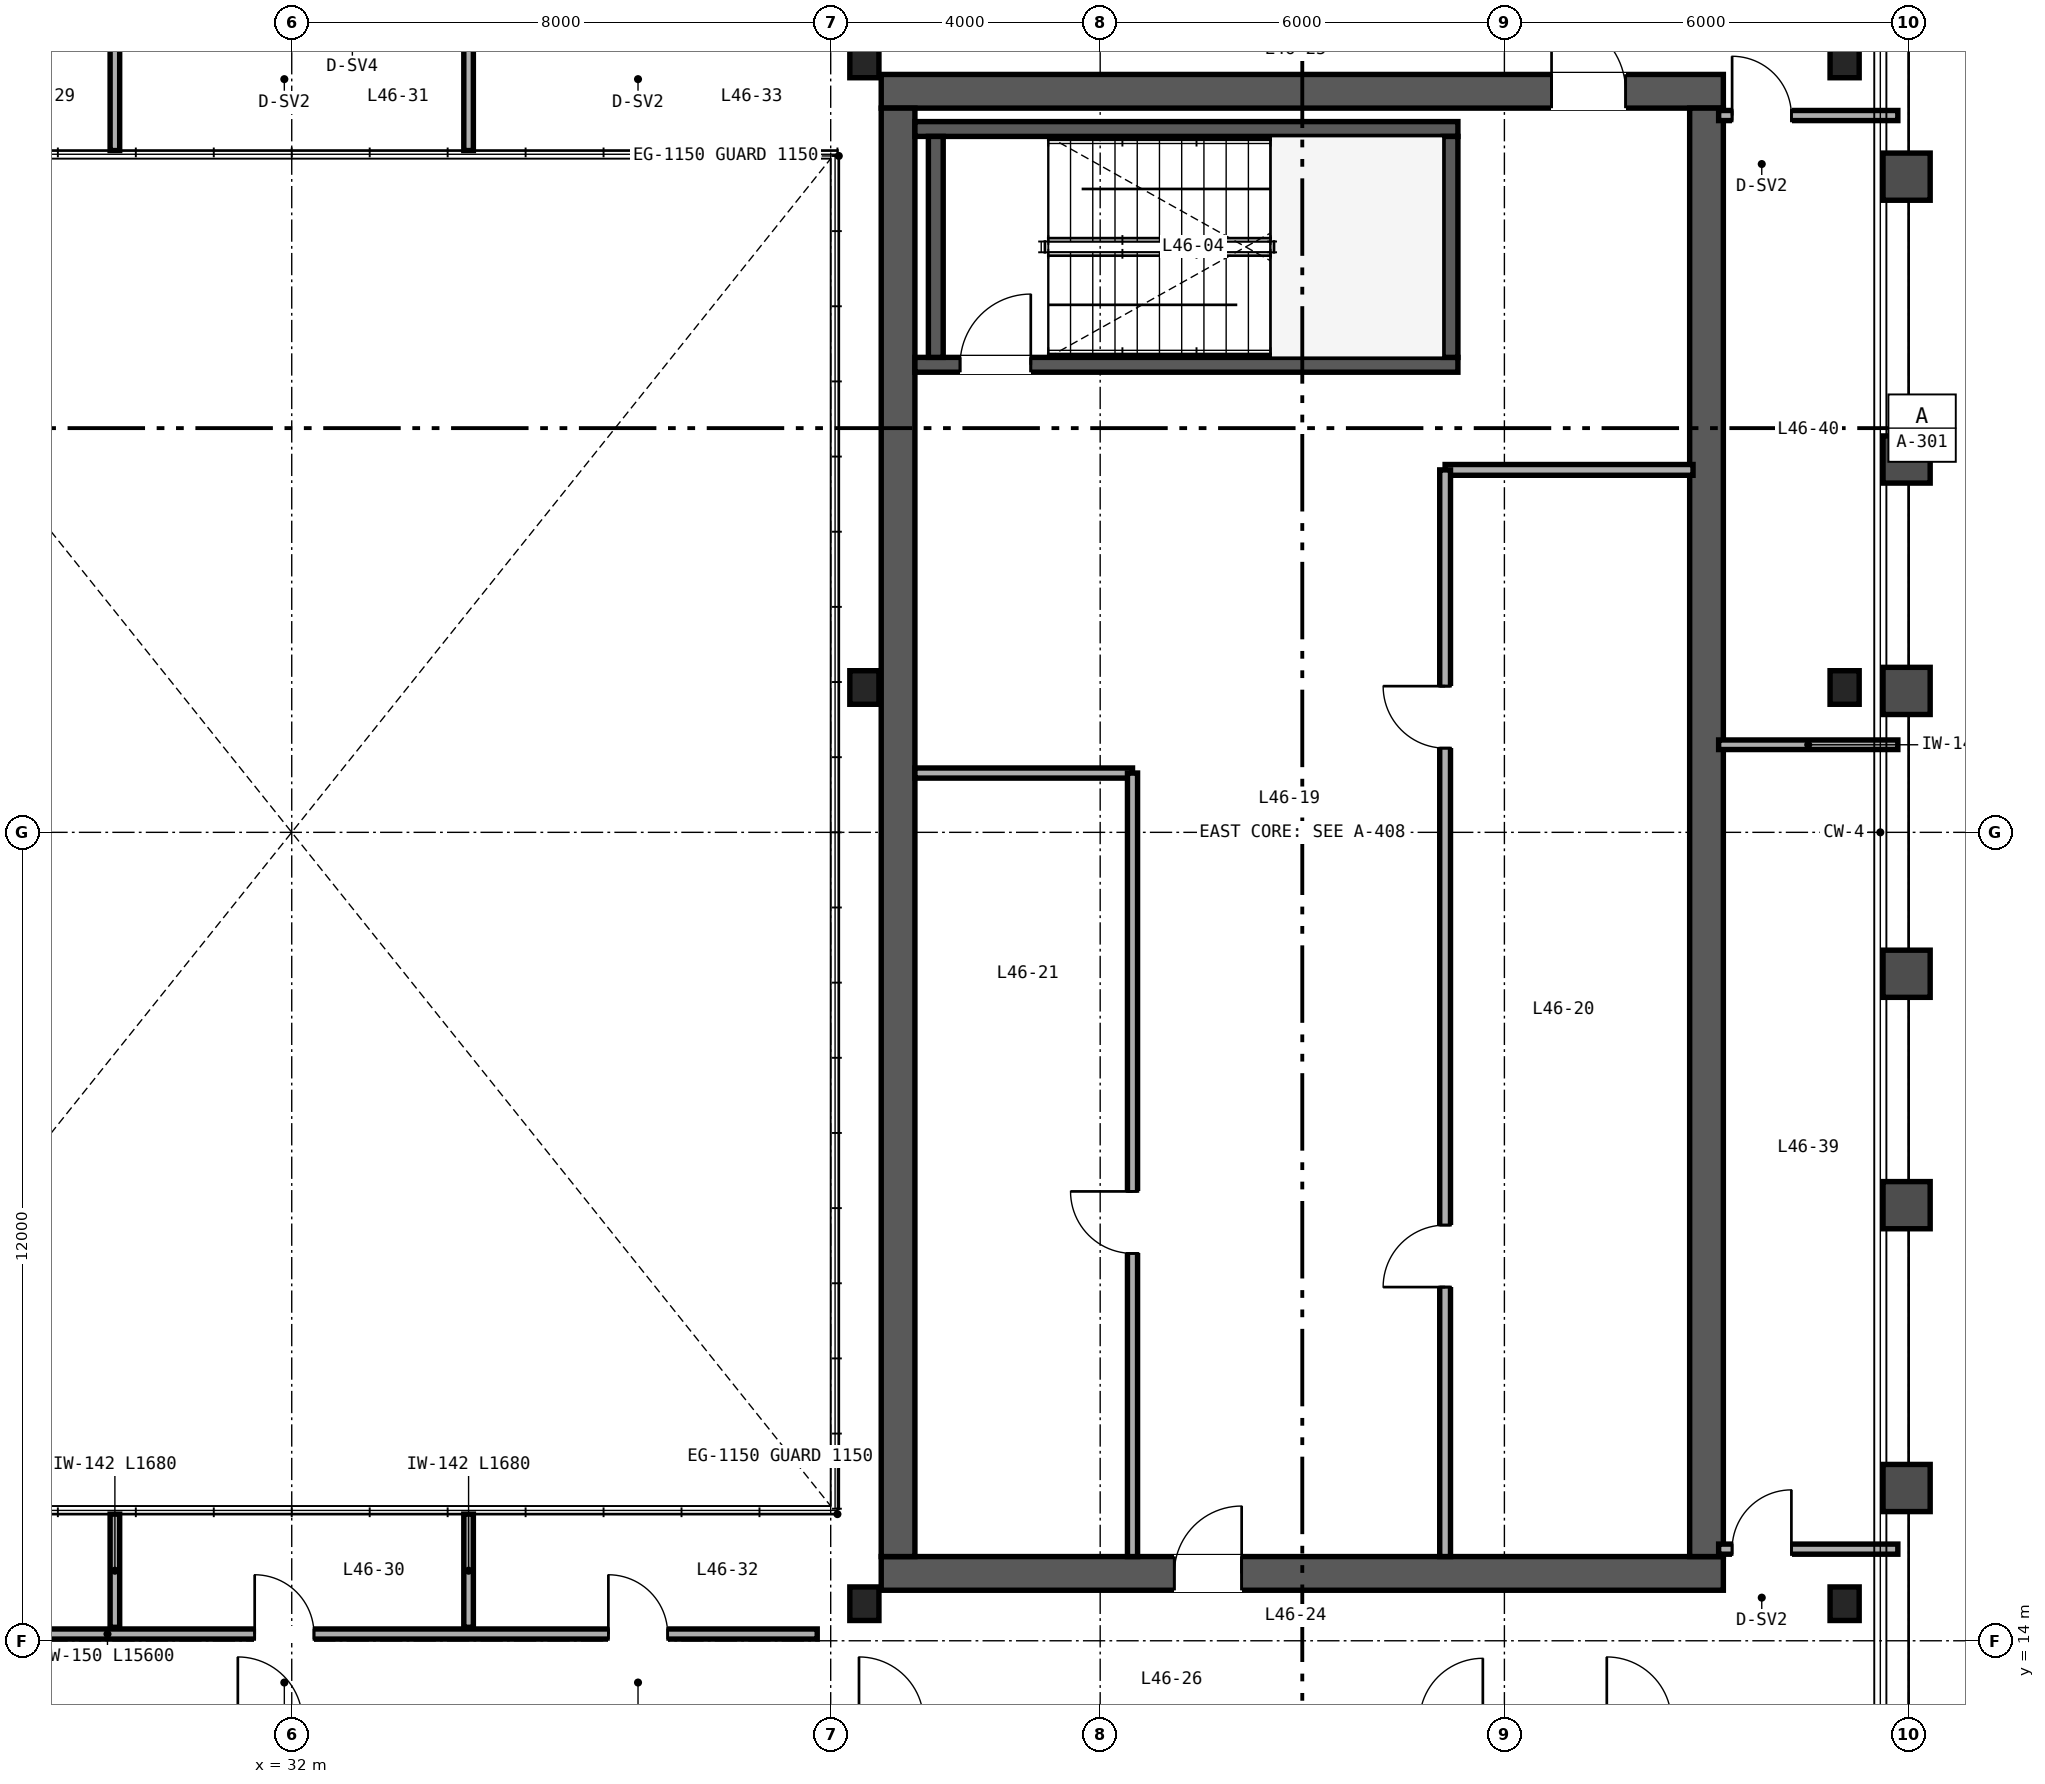
"""IFC4 building model, lengths in metres.
Left out: names, types, materials, properties, quantities, classifications, styles, units other than length and angle.
Written with IfcOpenShell. Run it as: python <this file> out.ifc"""

import sys

from ifc_helpers import new_model, si_unit, direction, frame, frame_2d, origin, origin_2d, place, context, subcontext, project, spatial, rectangle, i_section, extrude, source, transform, mapped, element, fill, save


model = new_model("IFC4")
c1 = context("Model", 3, precision=1e-05, world=origin(), true_north=direction((0.0, 1.0)))
c2 = subcontext(c1, "Body", "Model", "MODEL_VIEW")
j1 = project(units=[si_unit("LENGTHUNIT", "METRE"), si_unit("PLANEANGLEUNIT", "RADIAN")], contexts=[c1])
p1 = place(None, origin())
s1 = spatial("IfcSite", under=j1, at=p1, CompositionType="ELEMENT")
p2 = place(p1, origin())
s2 = spatial("IfcBuilding", under=s1, at=p2, CompositionType="ELEMENT")
p3 = place(p2, frame((0.0, 0.0, 184.8)))
s3 = spatial("IfcBuildingStorey", under=s2, at=p3, CompositionType="ELEMENT", Elevation=184.8)
p4 = place(p3, frame((40.75, 15.0, 0.0), z_axis=(0.0, 0.0, 1.0), x_axis=(1.0, 0.0, 0.0)))
e1 = element("IfcWall", 1, at=p4, inside=s3, PredefinedType="SHEAR", context=c2, shape_type="SweptSolid", body=[
    extrude(rectangle(XDim=12.5, YDim=0.5, at=frame_2d((6.25, 0.0))), origin(), (0.0, 0.0, 1.0), 3.37),
])
p5 = place(p4, frame((4.35, 0.0, 0.0)))
e2 = element("IfcOpeningElement", 2, at=p5, cuts=e1, PredefinedType="OPENING", context=c2, shape_type="SweptSolid", body=[
    extrude(rectangle(XDim=1.0, YDim=2.15, at=frame_2d((0.5, 1.075))), frame((0.0, 0.26, 0.0), z_axis=(0.0, -1.0, 0.0), x_axis=(1.0, 0.0, 0.0)), (0.0, 0.0, 1.0), 0.52),
])
p6 = place(p3, frame((40.75, 37.0, 0.0), z_axis=(0.0, 0.0, 1.0), x_axis=(1.0, 0.0, 0.0)))
e3 = element("IfcWall", 3, at=p6, inside=s3, PredefinedType="SHEAR", context=c2, shape_type="SweptSolid", body=[
    extrude(rectangle(XDim=12.5, YDim=0.5, at=frame_2d((6.25, 0.0))), origin(), (0.0, 0.0, 1.0), 3.37),
])
p7 = place(p6, frame((9.95, 0.0, 0.0)))
e4 = element("IfcOpeningElement", 4, at=p7, cuts=e3, PredefinedType="OPENING", context=c2, shape_type="SweptSolid", body=[
    extrude(rectangle(XDim=1.1, YDim=2.15, at=frame_2d((0.55, 1.075))), frame((0.0, 0.26, 0.0), z_axis=(0.0, -1.0, 0.0), x_axis=(1.0, 0.0, 0.0)), (0.0, 0.0, 1.0), 0.52),
])
for number, where, z_axis, x_axis in (
    (5, (41.0, 15.25, 0.0), (0.0, 0.0, 1.0), (0.0, 1.0, 0.0)),
    (6, (53.0, 15.25, 0.0), (0.0, 0.0, 1.0), (0.0, 1.0, 0.0)),
):
    element("IfcWall", number, at=place(p3, frame(where, z_axis=z_axis, x_axis=x_axis)), inside=s3, PredefinedType="SHEAR", context=c2, shape_type="SweptSolid", body=[
        extrude(rectangle(XDim=21.5, YDim=0.5, at=frame_2d((10.75, 0.0))), origin(), (0.0, 0.0, 1.0), 3.37),
    ])
p8 = place(p3, frame((41.25, 32.94, 0.0), z_axis=(0.0, 0.0, 1.0), x_axis=(1.0, 0.0, 0.0)))
e7 = element("IfcWall", 7, at=p8, inside=s3, PredefinedType="SHEAR", context=c2, shape_type="SweptSolid", body=[
    extrude(rectangle(XDim=8.06, YDim=0.22, at=frame_2d((4.03, 0.0))), origin(), (0.0, 0.0, 1.0), 3.4),
])
p9 = place(p8, frame((0.67, 0.0, 0.0)))
e8 = element("IfcOpeningElement", 8, at=p9, cuts=e7, PredefinedType="OPENING", context=c2, shape_type="SweptSolid", body=[
    extrude(rectangle(XDim=1.05, YDim=2.15, at=frame_2d((0.525, 1.075))), frame((0.0, 0.12, 0.0), z_axis=(0.0, -1.0, 0.0), x_axis=(1.0, 0.0, 0.0)), (0.0, 0.0, 1.0), 0.24),
])
p10 = place(p3, frame((41.25, 36.44, 0.0), z_axis=(0.0, 0.0, 1.0), x_axis=(1.0, 0.0, 0.0)))
e9 = element("IfcWall", 9, at=p10, inside=s3, PredefinedType="SHEAR", context=c2, shape_type="SweptSolid", body=[
    extrude(rectangle(XDim=8.06, YDim=0.22, at=frame_2d((4.03, 0.0))), origin(), (0.0, 0.0, 1.0), 3.4),
])
for number, where, z_axis, x_axis in (
    (10, (41.56, 33.05, 0.0), (0.0, 0.0, 1.0), (0.0, 1.0, 0.0)),
    (11, (49.2, 33.05, 0.0), (0.0, 0.0, 1.0), (0.0, 1.0, 0.0)),
):
    element("IfcWall", number, at=place(p3, frame(where, z_axis=z_axis, x_axis=x_axis)), inside=s3, PredefinedType="SHEAR", context=c2, shape_type="SweptSolid", body=[
        extrude(rectangle(XDim=3.28, YDim=0.22, at=frame_2d((1.64, 0.0))), origin(), (0.0, 0.0, 1.0), 3.4),
    ])
m1 = source(origin(), c2, "Body", "SweptSolid", [
    extrude(i_section(OverallWidth=0.432, OverallDepth=0.498, WebThickness=0.056, FlangeThickness=0.089, FilletRadius=0.025, at=origin_2d()), origin(), (0.0, 0.0, 1.0), 3.37),
])
for number, where, z_axis, x_axis in (
    (12, (40.5, 14.55, 0.0), (0.0, 0.0, 1.0), (1.0, 0.0, 0.0)),
    (13, (55.05, 14.55, 0.0), (0.0, 0.0, 1.0), (1.0, 0.0, 0.0)),
    (14, (40.5, 28.15, 0.0), (0.0, 0.0, 1.0), (1.0, 0.0, 0.0)),
    (15, (55.05, 28.15, 0.0), (0.0, 0.0, 1.0), (1.0, 0.0, 0.0)),
    (16, (40.5, 37.45, 0.0), (0.0, 0.0, 1.0), (1.0, 0.0, 0.0)),
    (17, (55.05, 37.45, 0.0), (0.0, 0.0, 1.0), (1.0, 0.0, 0.0)),
):
    element("IfcColumn", number, at=place(p3, frame(where, z_axis=z_axis, x_axis=x_axis)), inside=s3, PredefinedType="COLUMN", context=c2, shape_type="MappedRepresentation", body=[
        mapped(m1, transform((0.0, 0.0, 0.0), scale=1.0)),
    ])
p11 = place(p3, frame((49.12, 31.38, 0.0), z_axis=(0.0, 0.0, 1.0), x_axis=(1.0, 0.0, 0.0)))
e18 = element("IfcWall", 18, at=p11, inside=s3, PredefinedType="PARTITIONING", context=c2, shape_type="SweptSolid", body=[
    extrude(rectangle(XDim=3.68, YDim=0.16, at=frame_2d((1.84, 0.0))), origin(), (0.0, 0.0, 1.0), 2.47),
])
p12 = place(p3, frame((49.12, 15.25, 0.0), z_axis=(0.0, 0.0, 1.0), x_axis=(0.0, 1.0, 0.0)))
e19 = element("IfcWall", 19, at=p12, inside=s3, PredefinedType="PARTITIONING", context=c2, shape_type="SweptSolid", body=[
    extrude(rectangle(XDim=16.13, YDim=0.16, at=frame_2d((8.065, 0.0))), origin(), (0.0, 0.0, 1.0), 2.443),
])
p13 = place(p12, frame((4.0, 0.0, 0.0)))
e20 = element("IfcOpeningElement", 20, at=p13, cuts=e19, PredefinedType="OPENING", context=c2, shape_type="SweptSolid", body=[
    extrude(rectangle(XDim=0.92, YDim=2.15, at=frame_2d((0.46, 1.075))), frame((0.0, 0.09, 0.0), z_axis=(0.0, -1.0, 0.0), x_axis=(1.0, 0.0, 0.0)), (0.0, 0.0, 1.0), 0.18),
])
p14 = place(p12, frame((12.0, 0.0, 0.0)))
e21 = element("IfcOpeningElement", 21, at=p14, cuts=e19, PredefinedType="OPENING", context=c2, shape_type="SweptSolid", body=[
    extrude(rectangle(XDim=0.92, YDim=2.15, at=frame_2d((0.46, 1.075))), frame((0.0, 0.09, 0.0), z_axis=(0.0, -1.0, 0.0), x_axis=(1.0, 0.0, 0.0)), (0.0, 0.0, 1.0), 0.18),
])
p15 = place(p3, frame((41.25, 26.88, 0.0), z_axis=(0.0, 0.0, 1.0), x_axis=(1.0, 0.0, 0.0)))
e22 = element("IfcWall", 22, at=p15, inside=s3, PredefinedType="PARTITIONING", context=c2, shape_type="SweptSolid", body=[
    extrude(rectangle(XDim=3.23, YDim=0.15, at=frame_2d((1.615, 0.0))), origin(), (0.0, 0.0, 1.0), 3.37),
])
p16 = place(p3, frame((44.48, 15.25, 0.0), z_axis=(0.0, 0.0, 1.0), x_axis=(0.0, 1.0, 0.0)))
e23 = element("IfcWall", 23, at=p16, inside=s3, PredefinedType="PARTITIONING", context=c2, shape_type="SweptSolid", body=[
    extrude(rectangle(XDim=11.63, YDim=0.15, at=frame_2d((5.815, 0.0))), origin(), (0.0, 0.0, 1.0), 3.37),
])
p17 = place(p16, frame((4.5, 0.0, 0.0)))
e24 = element("IfcOpeningElement", 24, at=p17, cuts=e23, PredefinedType="OPENING", context=c2, shape_type="SweptSolid", body=[
    extrude(rectangle(XDim=0.92, YDim=2.15, at=frame_2d((0.46, 1.075))), frame((0.0, 0.085, 0.0), z_axis=(0.0, -1.0, 0.0), x_axis=(1.0, 0.0, 0.0)), (0.0, 0.0, 1.0), 0.17),
])
p18 = place(p3, frame((24.2, 14.1, 0.0), z_axis=(0.0, 0.0, 1.0), x_axis=(1.0, 0.0, 0.0)))
e25 = element("IfcWall", 25, at=p18, inside=s3, PredefinedType="PARTITIONING", context=c2, shape_type="SweptSolid", body=[
    extrude(rectangle(XDim=15.6, YDim=0.15, at=frame_2d((7.8, 0.0))), origin(), (0.0, 0.0, 1.0), 3.37),
])
p19 = place(p18, frame((2.0, 0.0, 0.0)))
e26 = element("IfcOpeningElement", 26, at=p19, cuts=e25, PredefinedType="OPENING", context=c2, shape_type="SweptSolid", body=[
    extrude(rectangle(XDim=0.88, YDim=2.15, at=frame_2d((0.44, 1.075))), frame((0.0, 0.085, 0.0), z_axis=(0.0, -1.0, 0.0), x_axis=(1.0, 0.0, 0.0)), (0.0, 0.0, 1.0), 0.17),
])
p20 = place(p18, frame((7.25, 0.0, 0.0)))
e27 = element("IfcOpeningElement", 27, at=p20, cuts=e25, PredefinedType="OPENING", context=c2, shape_type="SweptSolid", body=[
    extrude(rectangle(XDim=0.88, YDim=2.15, at=frame_2d((0.44, 1.075))), frame((0.0, 0.085, 0.0), z_axis=(0.0, -1.0, 0.0), x_axis=(1.0, 0.0, 0.0)), (0.0, 0.0, 1.0), 0.17),
])
p21 = place(p18, frame((12.5, 0.0, 0.0)))
e28 = element("IfcOpeningElement", 28, at=p21, cuts=e25, PredefinedType="OPENING", context=c2, shape_type="SweptSolid", body=[
    extrude(rectangle(XDim=0.88, YDim=2.15, at=frame_2d((0.44, 1.075))), frame((0.0, 0.085, 0.0), z_axis=(0.0, -1.0, 0.0), x_axis=(1.0, 0.0, 0.0)), (0.0, 0.0, 1.0), 0.17),
])
for number, where, z_axis, x_axis in (
    (29, (29.375, 14.2, 0.0), (0.0, 0.0, 1.0), (0.0, 1.0, 0.0)),
    (30, (29.375, 36.12, 0.0), (0.0, 0.0, 1.0), (0.0, 1.0, 0.0)),
    (31, (34.625, 14.2, 0.0), (0.0, 0.0, 1.0), (0.0, 1.0, 0.0)),
    (32, (34.625, 36.12, 0.0), (0.0, 0.0, 1.0), (0.0, 1.0, 0.0)),
):
    element("IfcWall", number, at=place(p3, frame(where, z_axis=z_axis, x_axis=x_axis)), inside=s3, PredefinedType="PARTITIONING", context=c2, shape_type="SweptSolid", body=[
        extrude(rectangle(XDim=1.68, YDim=0.142, at=frame_2d((0.84, 0.0))), origin(), (0.0, 0.0, 1.0), 3.37),
    ])
p22 = place(p3, frame((53.18, 15.36, 0.0), z_axis=(0.0, 0.0, 1.0), x_axis=(1.0, 0.0, 0.0)))
e33 = element("IfcWall", 33, at=p22, inside=s3, PredefinedType="PARTITIONING", context=c2, shape_type="SweptSolid", body=[
    extrude(rectangle(XDim=2.66, YDim=0.15, at=frame_2d((1.33, 0.0))), origin(), (0.0, 0.0, 1.0), 2.591),
])
p23 = place(p22, frame((0.2, 0.0, 0.0)))
e34 = element("IfcOpeningElement", 34, at=p23, cuts=e33, PredefinedType="OPENING", context=c2, shape_type="SweptSolid", body=[
    extrude(rectangle(XDim=0.88, YDim=2.15, at=frame_2d((0.44, 1.075))), frame((0.0, 0.085, 0.0), z_axis=(0.0, -1.0, 0.0), x_axis=(1.0, 0.0, 0.0)), (0.0, 0.0, 1.0), 0.17),
])
p24 = place(p3, frame((53.18, 36.64, 0.0), z_axis=(0.0, 0.0, 1.0), x_axis=(1.0, 0.0, 0.0)))
e35 = element("IfcWall", 35, at=p24, inside=s3, PredefinedType="PARTITIONING", context=c2, shape_type="SweptSolid", body=[
    extrude(rectangle(XDim=2.66, YDim=0.15, at=frame_2d((1.33, 0.0))), origin(), (0.0, 0.0, 1.0), 2.753),
])
p25 = place(p24, frame((0.2, 0.0, 0.0)))
e36 = element("IfcOpeningElement", 36, at=p25, cuts=e35, PredefinedType="OPENING", context=c2, shape_type="SweptSolid", body=[
    extrude(rectangle(XDim=0.88, YDim=2.15, at=frame_2d((0.44, 1.075))), frame((0.0, 0.085, 0.0), z_axis=(0.0, -1.0, 0.0), x_axis=(1.0, 0.0, 0.0)), (0.0, 0.0, 1.0), 0.17),
])
p26 = place(p3, frame((53.18, 27.3, 0.0), z_axis=(0.0, 0.0, 1.0), x_axis=(1.0, 0.0, 0.0)))
e37 = element("IfcWall", 37, at=p26, inside=s3, PredefinedType="PARTITIONING", context=c2, shape_type="SweptSolid", body=[
    extrude(rectangle(XDim=2.66, YDim=0.142, at=frame_2d((1.33, 0.0))), origin(), (0.0, 0.0, 1.0), 2.591),
])
m2 = source(origin(), c2, "Body", "SweptSolid", [
    extrude(rectangle(XDim=1.05, YDim=2.15, at=frame_2d((0.525, 1.075))), frame((0.0, 0.025, 0.0), z_axis=(0.0, -1.0, 0.0), x_axis=(1.0, 0.0, 0.0)), (0.0, 0.0, 1.0), 0.05),
])
p27 = place(p9, origin())
e38 = element("IfcDoor", 38, at=p27, inside=s3, OperationType="SINGLE_SWING_RIGHT", PredefinedType="DOOR", context=c2, shape_type="MappedRepresentation", body=[
    mapped(m2, transform((0.0, 0.0, 0.0), scale=1.0)),
])
fill(e8, e38)
m3 = source(origin(), c2, "Body", "SweptSolid", [
    extrude(rectangle(XDim=1.0, YDim=2.15, at=frame_2d((0.5, 1.075))), frame((0.0, 0.025, 0.0), z_axis=(0.0, -1.0, 0.0), x_axis=(1.0, 0.0, 0.0)), (0.0, 0.0, 1.0), 0.05),
])
p28 = place(p5, origin())
e39 = element("IfcDoor", 39, at=p28, inside=s3, OperationType="SINGLE_SWING_RIGHT", PredefinedType="DOOR", context=c2, shape_type="MappedRepresentation", body=[
    mapped(m3, transform((0.0, 0.0, 0.0), scale=1.0)),
])
fill(e2, e39)
m4 = source(origin(), c2, "Body", "SweptSolid", [
    extrude(rectangle(XDim=1.1, YDim=2.15, at=frame_2d((0.55, 1.075))), frame((0.0, 0.025, 0.0), z_axis=(0.0, -1.0, 0.0), x_axis=(1.0, 0.0, 0.0)), (0.0, 0.0, 1.0), 0.05),
])
p29 = place(p7, origin())
e40 = element("IfcDoor", 40, at=p29, inside=s3, OperationType="SINGLE_SWING_LEFT", PredefinedType="DOOR", context=c2, shape_type="MappedRepresentation", body=[
    mapped(m4, transform((0.0, 0.0, 0.0), scale=1.0)),
])
fill(e4, e40)
m5 = source(origin(), c2, "Body", "SweptSolid", [
    extrude(rectangle(XDim=0.92, YDim=2.15, at=frame_2d((0.46, 1.075))), frame((0.0, 0.025, 0.0), z_axis=(0.0, -1.0, 0.0), x_axis=(1.0, 0.0, 0.0)), (0.0, 0.0, 1.0), 0.05),
])
p30 = place(p13, origin())
e41 = element("IfcDoor", 41, at=p30, inside=s3, OperationType="SINGLE_SWING_LEFT", PredefinedType="DOOR", context=c2, shape_type="MappedRepresentation", body=[
    mapped(m5, transform((0.0, 0.0, 0.0), scale=1.0)),
])
fill(e20, e41)
p31 = place(p14, origin())
e42 = element("IfcDoor", 42, at=p31, inside=s3, OperationType="SINGLE_SWING_RIGHT", PredefinedType="DOOR", context=c2, shape_type="MappedRepresentation", body=[
    mapped(m5, transform((0.0, 0.0, 0.0), scale=1.0)),
])
fill(e21, e42)
p32 = place(p17, origin())
e43 = element("IfcDoor", 43, at=p32, inside=s3, OperationType="SINGLE_SWING_RIGHT", PredefinedType="DOOR", context=c2, shape_type="MappedRepresentation", body=[
    mapped(m5, transform((0.0, 0.0, 0.0), scale=1.0)),
])
fill(e24, e43)
m6 = source(origin(), c2, "Body", "SweptSolid", [
    extrude(rectangle(XDim=0.88, YDim=2.15, at=frame_2d((0.44, 1.075))), frame((0.0, 0.025, 0.0), z_axis=(0.0, -1.0, 0.0), x_axis=(1.0, 0.0, 0.0)), (0.0, 0.0, 1.0), 0.05),
])
p33 = place(p20, origin())
e44 = element("IfcDoor", 44, at=p33, inside=s3, OperationType="SINGLE_SWING_LEFT", PredefinedType="DOOR", context=c2, shape_type="MappedRepresentation", body=[
    mapped(m6, transform((0.0, 0.0, 0.0), scale=1.0)),
])
fill(e27, e44)
p34 = place(p21, origin())
e45 = element("IfcDoor", 45, at=p34, inside=s3, OperationType="SINGLE_SWING_LEFT", PredefinedType="DOOR", context=c2, shape_type="MappedRepresentation", body=[
    mapped(m6, transform((0.0, 0.0, 0.0), scale=1.0)),
])
fill(e28, e45)
p35 = place(p23, origin())
e46 = element("IfcDoor", 46, at=p35, inside=s3, OperationType="SINGLE_SWING_RIGHT", PredefinedType="DOOR", context=c2, shape_type="MappedRepresentation", body=[
    mapped(m6, transform((0.0, 0.0, 0.0), scale=1.0)),
])
fill(e34, e46)
p36 = place(p25, origin())
e47 = element("IfcDoor", 47, at=p36, inside=s3, OperationType="SINGLE_SWING_LEFT", PredefinedType="DOOR", context=c2, shape_type="MappedRepresentation", body=[
    mapped(m6, transform((0.0, 0.0, 0.0), scale=1.0)),
])
fill(e36, e47)
save(model, sys.argv[1])
